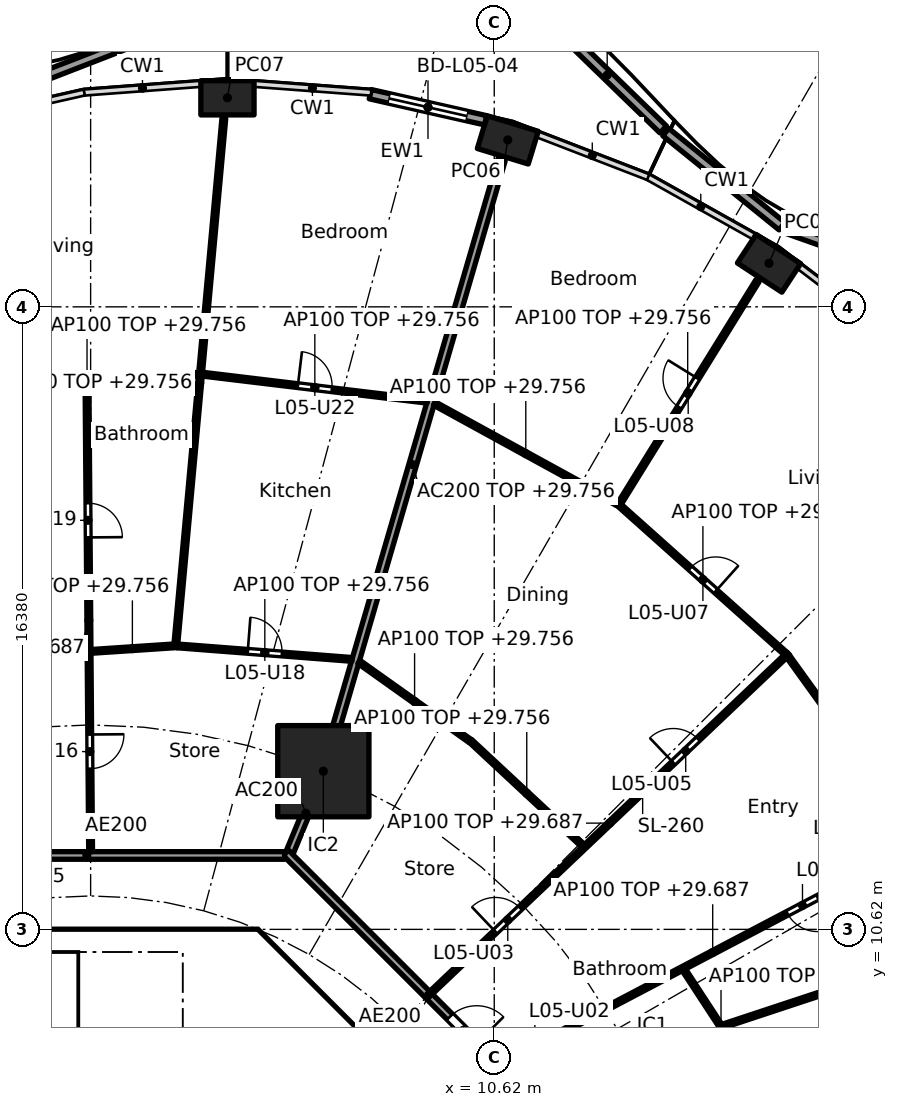
"""IFC4 building model, lengths in metres.
Left out: names, types, materials, properties, quantities, classifications, styles, units other than length and angle.
Written with IfcOpenShell. Run it as: python <this file> out.ifc"""

import sys

from ifc_helpers import new_model, si_unit, direction, frame, frame_2d, origin, origin_2d, place, context, subcontext, project, spatial, polyline, rectangle, hollow_rectangle, outline, extrude, element, fill, save


model = new_model("IFC4")
c1 = context("Model", 3, precision=1e-05, world=origin(), true_north=direction((0.0, 1.0)))
c2 = subcontext(c1, "Body", "Model", "MODEL_VIEW")
j1 = project(units=[si_unit("LENGTHUNIT", "METRE"), si_unit("PLANEANGLEUNIT", "RADIAN")], contexts=[c1])
p1 = place(None, origin())
s1 = spatial("IfcSite", under=j1, at=p1, CompositionType="ELEMENT")
p2 = place(p1, origin())
s2 = spatial("IfcBuilding", under=s1, at=p2, CompositionType="ELEMENT")
p3 = place(p2, frame((0.0, 0.0, 27.0)))
s3 = spatial("IfcBuildingStorey", under=s2, at=p3, CompositionType="ELEMENT", Elevation=27.0)
for number, where, z_axis, x_axis in (
    (1, (17.85, 28.146, 0.0), (0.0, 0.0, 1.0), (-0.836, 0.549, 0.0)),
    (2, (10.976, 31.393, 0.0), (0.0, 0.0, 1.0), (-0.957, 0.292, 0.0)),
    (3, (3.6, 32.5, 0.0), (0.0, 0.0, 1.0), (-1.0, 0.0, 0.0)),
):
    element("IfcColumn", number, at=place(p3, frame(where, z_axis=z_axis, x_axis=x_axis)), inside=s3, PredefinedType="COLUMN", context=c2, shape_type="SweptSolid", body=[
        extrude(hollow_rectangle(XDim=1.4, YDim=0.9, WallThickness=0.05, at=origin_2d()), origin(), (0.0, 0.0, 1.0), 3.7),
    ])
p4 = place(p3, frame((6.123, 14.782, 0.0), z_axis=(0.0, 0.0, 1.0), x_axis=(1.0, 0.0, 0.0)))
e4 = element("IfcColumn", 4, at=p4, inside=s3, PredefinedType="COLUMN", context=c2, shape_type="SweptSolid", body=[
    extrude(rectangle(XDim=2.4, YDim=2.4, at=origin_2d()), origin(), (0.0, 0.0, 1.0), 3.7),
])
p5 = place(p3, frame((7.358, 32.596, 0.0), z_axis=(0.0, 0.0, 1.0), x_axis=(0.97533495413, -0.220729987208, 0.0)))
e5 = element("IfcWall", 5, at=p5, inside=s3, PredefinedType="SOLIDWALL", context=c2, shape_type="SweptSolid", body=[
    extrude(rectangle(XDim=3.115, YDim=0.25, at=frame_2d((1.557, 0.0))), origin(), (0.0, 0.0, 1.0), 3.44),
])
p6 = place(p5, frame((0.507, 0.0, 0.0)))
e6 = element("IfcOpeningElement", 6, at=p6, cuts=e5, PredefinedType="OPENING", context=c2, shape_type="SweptSolid", body=[
    extrude(rectangle(XDim=2.1, YDim=2.4, at=frame_2d((1.05, 1.2))), frame((0.0, 0.135, 0.0), z_axis=(0.0, -1.0, 0.0), x_axis=(1.0, 0.0, 0.0)), (0.0, 0.0, 1.0), 0.27),
])
p7 = place(p3, frame((24.573, 26.838, 0.0), z_axis=(0.0, 0.0, 1.0), x_axis=(-0.94252427227, 0.334137690453, 0.0)))
e7 = element("IfcWall", 7, at=p7, inside=s3, PredefinedType="PARAPET", context=c2, shape_type="SweptSolid", body=[
    extrude(rectangle(XDim=6.657, YDim=0.25, at=frame_2d((3.329, 0.0))), origin(), (0.0, 0.0, 1.0), 1.1),
])
p8 = place(p3, frame((18.193, 29.122, 0.0), z_axis=(0.0, 0.0, 1.0), x_axis=(-0.777298307168, 0.62913221319, 0.0)))
e8 = element("IfcWall", 8, at=p8, inside=s3, PredefinedType="PARAPET", context=c2, shape_type="SweptSolid", body=[
    extrude(rectangle(XDim=3.937, YDim=0.25, at=frame_2d((1.968, 0.0))), origin(), (0.0, 0.0, 1.0), 1.1),
])
p9 = place(p3, frame((15.066, 31.667, 0.0), z_axis=(0.0, 0.0, 1.0), x_axis=(-0.717813068458, 0.696235878672, 0.0)))
e9 = element("IfcWall", 9, at=p9, inside=s3, PredefinedType="PARAPET", context=c2, shape_type="SweptSolid", body=[
    extrude(rectangle(XDim=4.107, YDim=0.25, at=frame_2d((2.054, 0.0))), origin(), (0.0, 0.0, 1.0), 1.1),
])
p10 = place(p3, frame((3.713, 34.99, 0.0), z_axis=(0.0, 0.0, 1.0), x_axis=(-0.932281162563, -0.361734479874, 0.0)))
e10 = element("IfcWall", 10, at=p10, inside=s3, PredefinedType="PARAPET", context=c2, shape_type="SweptSolid", body=[
    extrude(rectangle(XDim=5.513, YDim=0.25, at=frame_2d((2.756, 0.0))), origin(), (0.0, 0.0, 1.0), 1.1),
])
p11 = place(p3, frame((9.988, 4.613, 0.0), z_axis=(0.0, 0.0, 1.0), x_axis=(-0.707106781187, 0.707106781187, 0.0)))
e11 = element("IfcWall", 11, at=p11, inside=s3, PredefinedType="SHEAR", context=c2, shape_type="SweptSolid", body=[
    extrude(rectangle(XDim=7.602, YDim=0.6, at=frame_2d((3.801, 0.0))), origin(), (0.0, 0.0, 1.0), 3.44),
])
p12 = place(p11, frame((3.201, 0.0, 0.0)))
e12 = element("IfcOpeningElement", 12, at=p12, cuts=e11, PredefinedType="OPENING", context=c2, shape_type="SweptSolid", body=[
    extrude(rectangle(XDim=1.2, YDim=2.1, at=frame_2d((0.6, 1.05))), frame((0.0, 0.31, 0.0), z_axis=(0.0, -1.0, 0.0), x_axis=(1.0, 0.0, 0.0)), (0.0, 0.0, 1.0), 0.62),
])
p13 = place(p3, frame((4.0, 7.025, 0.0), z_axis=(0.0, 0.0, 1.0), x_axis=(0.0, 1.0, 0.0)))
e13 = element("IfcWall", 13, at=p13, inside=s3, PredefinedType="SOLIDWALL", context=c2, shape_type="SweptSolid", body=[
    extrude(rectangle(XDim=3.0, YDim=0.2, at=frame_2d((1.5, 0.0))), origin(), (0.0, 0.0, 1.0), 3.44),
])
p14 = place(p13, frame((0.925, 0.0, 0.0)))
e14 = element("IfcOpeningElement", 14, at=p14, cuts=e13, PredefinedType="OPENING", context=c2, shape_type="SweptSolid", body=[
    extrude(rectangle(XDim=1.1, YDim=2.1, at=frame_2d((0.55, 1.05))), frame((0.0, 0.11, 0.0), z_axis=(0.0, -1.0, 0.0), x_axis=(1.0, 0.0, 0.0)), (0.0, 0.0, 1.0), 0.22),
])
p15 = place(p3, origin())
e15 = element("IfcWall", 15, at=p15, inside=s3, PredefinedType="SHEAR", context=c2, shape_type="SweptSolid", body=[
    extrude(outline(polyline([(-4.152, 10.025), (-4.401, 9.776), (-4.825, 10.2), (-4.401, 10.625), (4.401, 10.625), (4.825, 10.2), (4.401, 9.776), (4.152, 10.025), (-4.152, 10.025)])), origin(), (0.0, 0.0, 1.0), 3.44),
])
p16 = place(p3, frame((5.243, 12.657, 0.0), z_axis=(0.0, 0.0, 1.0), x_axis=(0.382707856524, 0.923869415315, 0.0)))
e16 = element("IfcWall", 16, at=p16, inside=s3, PredefinedType="PARTITIONING", context=c2, shape_type="SweptSolid", body=[
    extrude(rectangle(XDim=2.2, YDim=0.2, at=frame_2d((1.1, 0.0))), origin(), (0.0, 0.0, 1.0), 3.44),
])
p17 = place(p3, frame((6.137, 14.83, 0.0), z_axis=(0.0, 0.0, 1.0), x_axis=(0.27985745069, 0.960041565399, 0.0)))
e17 = element("IfcWall", 17, at=p17, inside=s3, PredefinedType="PARTITIONING", context=c2, shape_type="SweptSolid", body=[
    extrude(rectangle(XDim=16.705, YDim=0.2, at=frame_2d((8.353, 0.0))), origin(), (0.0, 0.0, 1.0), 2.756),
])
p18 = place(p3, frame((12.635, 5.134, 0.0), z_axis=(0.0, 0.0, 1.0), x_axis=(-0.707106781187, 0.707106781187, 0.0)))
e18 = element("IfcWall", 18, at=p18, inside=s3, PredefinedType="PARTITIONING", context=c2, shape_type="SweptSolid", body=[
    extrude(rectangle(XDim=10.609, YDim=0.2, at=frame_2d((5.305, 0.0))), origin(), (0.0, 0.0, 1.0), 3.44),
])
p19 = place(p18, frame((3.503, 0.0, 0.0)))
e19 = element("IfcOpeningElement", 19, at=p19, cuts=e18, PredefinedType="OPENING", context=c2, shape_type="SweptSolid", body=[
    extrude(rectangle(XDim=1.0, YDim=2.1, at=frame_2d((0.5, 1.05))), frame((0.0, 0.11, 0.0), z_axis=(0.0, -1.0, 0.0), x_axis=(1.0, 0.0, 0.0)), (0.0, 0.0, 1.0), 0.22),
])
p20 = place(p3, frame((5.104, 12.565, 0.0), z_axis=(0.0, 0.0, 1.0), x_axis=(-1.0, 0.0, 0.0)))
e20 = element("IfcWall", 20, at=p20, inside=s3, PredefinedType="PARTITIONING", context=c2, shape_type="SweptSolid", body=[
    extrude(rectangle(XDim=10.409, YDim=0.2, at=frame_2d((5.205, 0.0))), origin(), (0.0, 0.0, 1.0), 3.44),
])
p21 = place(p20, frame((6.339, 0.0, 0.0)))
e21 = element("IfcOpeningElement", 21, at=p21, cuts=e20, PredefinedType="OPENING", context=c2, shape_type="SweptSolid", body=[
    extrude(rectangle(XDim=1.0, YDim=2.1, at=frame_2d((0.5, 1.05))), frame((0.0, 0.11, 0.0), z_axis=(0.0, -1.0, 0.0), x_axis=(1.0, 0.0, 0.0)), (0.0, 0.0, 1.0), 0.22),
])
p22 = place(p3, frame((17.564, 6.569, 0.0), z_axis=(0.0, 0.0, 1.0), x_axis=(-0.547641765292, 0.836712911881, 0.0)))
e22 = element("IfcWall", 22, at=p22, inside=s3, PredefinedType="PARTITIONING", context=c2, shape_type="SweptSolid", body=[
    extrude(rectangle(XDim=3.57, YDim=0.1, at=frame_2d((1.785, 0.0))), origin(), (0.0, 0.0, 1.0), 2.756),
])
p23 = place(p3, frame((16.635, 8.078, 0.0), z_axis=(0.0, 0.0, 1.0), x_axis=(0.949412285442, 0.314032342684, 0.0)))
e23 = element("IfcWall", 23, at=p23, inside=s3, PredefinedType="PARTITIONING", context=c2, shape_type="SweptSolid", body=[
    extrude(rectangle(XDim=14.451, YDim=0.1, at=frame_2d((7.226, 0.0))), origin(), (0.0, 0.0, 1.0), 2.837),
])
p24 = place(p3, frame((10.813, 7.091, 0.0), z_axis=(0.0, 0.0, 1.0), x_axis=(0.885182649479, 0.465243674928, 0.0)))
e24 = element("IfcWall", 24, at=p24, inside=s3, PredefinedType="PARTITIONING", context=c2, shape_type="SweptSolid", body=[
    extrude(rectangle(XDim=12.551, YDim=0.1, at=frame_2d((6.275, 0.0))), origin(), (0.0, 0.0, 1.0), 2.687),
])
p25 = place(p24, frame((0.539, 0.0, 0.0)))
e25 = element("IfcOpeningElement", 25, at=p25, cuts=e24, PredefinedType="OPENING", context=c2, shape_type="SweptSolid", body=[
    extrude(rectangle(XDim=0.9, YDim=2.1, at=frame_2d((0.45, 1.05))), frame((0.0, 0.06, 0.0), z_axis=(0.0, -1.0, 0.0), x_axis=(1.0, 0.0, 0.0)), (0.0, 0.0, 1.0), 0.12),
])
p26 = place(p24, frame((8.494, 0.0, 0.0)))
e26 = element("IfcOpeningElement", 26, at=p26, cuts=e24, PredefinedType="OPENING", context=c2, shape_type="SweptSolid", body=[
    extrude(rectangle(XDim=0.9, YDim=2.1, at=frame_2d((0.45, 1.05))), frame((0.0, 0.06, 0.0), z_axis=(0.0, -1.0, 0.0), x_axis=(1.0, 0.0, 0.0)), (0.0, 0.0, 1.0), 0.12),
])
p27 = place(p3, frame((21.849, 12.948, 0.0), z_axis=(0.0, 0.0, 1.0), x_axis=(-0.584563700282, 0.811347817099, 0.0)))
e27 = element("IfcWall", 27, at=p27, inside=s3, PredefinedType="PARTITIONING", context=c2, shape_type="SweptSolid", body=[
    extrude(rectangle(XDim=5.984, YDim=0.1, at=frame_2d((2.992, 0.0))), origin(), (0.0, 0.0, 1.0), 2.756),
])
p28 = place(p27, frame((1.046, 0.0, 0.0)))
e28 = element("IfcOpeningElement", 28, at=p28, cuts=e27, PredefinedType="OPENING", context=c2, shape_type="SweptSolid", body=[
    extrude(rectangle(XDim=0.9, YDim=2.1, at=frame_2d((0.45, 1.05))), frame((0.0, 0.06, 0.0), z_axis=(0.0, -1.0, 0.0), x_axis=(1.0, 0.0, 0.0)), (0.0, 0.0, 1.0), 0.12),
])
p29 = place(p3, frame((8.957, 8.953, 0.0), z_axis=(0.0, 0.0, 1.0), x_axis=(0.725250022034, 0.688485588476, 0.0)))
e29 = element("IfcWall", 29, at=p29, inside=s3, PredefinedType="PARTITIONING", context=c2, shape_type="SweptSolid", body=[
    extrude(rectangle(XDim=12.963, YDim=0.1, at=frame_2d((6.481, 0.0))), origin(), (0.0, 0.0, 1.0), 2.687),
])
p30 = place(p29, frame((2.333, 0.0, 0.0)))
e30 = element("IfcOpeningElement", 30, at=p30, cuts=e29, PredefinedType="OPENING", context=c2, shape_type="SweptSolid", body=[
    extrude(rectangle(XDim=0.9, YDim=2.1, at=frame_2d((0.45, 1.05))), frame((0.0, 0.06, 0.0), z_axis=(0.0, -1.0, 0.0), x_axis=(1.0, 0.0, 0.0)), (0.0, 0.0, 1.0), 0.12),
])
p31 = place(p29, frame((8.79, 0.0, 0.0)))
e31 = element("IfcOpeningElement", 31, at=p31, cuts=e29, PredefinedType="OPENING", context=c2, shape_type="SweptSolid", body=[
    extrude(rectangle(XDim=0.9, YDim=2.1, at=frame_2d((0.45, 1.05))), frame((0.0, 0.06, 0.0), z_axis=(0.0, -1.0, 0.0), x_axis=(1.0, 0.0, 0.0)), (0.0, 0.0, 1.0), 0.12),
])
p32 = place(p3, frame((12.958, 12.82, 0.0), z_axis=(0.0, 0.0, 1.0), x_axis=(-0.732028724098, 0.681273768096, 0.0)))
e32 = element("IfcWall", 32, at=p32, inside=s3, PredefinedType="PARTITIONING", context=c2, shape_type="SweptSolid", body=[
    extrude(rectangle(XDim=4.05, YDim=0.1, at=frame_2d((2.025, 0.0))), origin(), (0.0, 0.0, 1.0), 2.756),
])
p33 = place(p3, frame((18.285, 17.877, 0.0), z_axis=(0.0, 0.0, 1.0), x_axis=(-0.745806142791, 0.666163041136, 0.0)))
e33 = element("IfcWall", 33, at=p33, inside=s3, PredefinedType="PARTITIONING", context=c2, shape_type="SweptSolid", body=[
    extrude(rectangle(XDim=5.831, YDim=0.1, at=frame_2d((2.915, 0.0))), origin(), (0.0, 0.0, 1.0), 2.756),
])
p34 = place(p33, frame((2.465, 0.0, 0.0)))
e34 = element("IfcOpeningElement", 34, at=p34, cuts=e33, PredefinedType="OPENING", context=c2, shape_type="SweptSolid", body=[
    extrude(rectangle(XDim=0.9, YDim=2.1, at=frame_2d((0.45, 1.05))), frame((0.0, 0.06, 0.0), z_axis=(0.0, -1.0, 0.0), x_axis=(1.0, 0.0, 0.0)), (0.0, 0.0, 1.0), 0.12),
])
p35 = place(p3, frame((9.989, 15.574, 0.0), z_axis=(0.0, 0.0, 1.0), x_axis=(-0.81492039338, 0.57957290521, 0.0)))
e35 = element("IfcWall", 35, at=p35, inside=s3, PredefinedType="PARTITIONING", context=c2, shape_type="SweptSolid", body=[
    extrude(rectangle(XDim=3.594, YDim=0.1, at=frame_2d((1.797, 0.0))), origin(), (0.0, 0.0, 1.0), 2.756),
])
p36 = place(p3, frame((13.873, 21.752, 0.0), z_axis=(0.0, 0.0, 1.0), x_axis=(0.52644491616, 0.850209239099, 0.0)))
e36 = element("IfcWall", 36, at=p36, inside=s3, PredefinedType="PARTITIONING", context=c2, shape_type="SweptSolid", body=[
    extrude(rectangle(XDim=6.98, YDim=0.1, at=frame_2d((3.49, 0.0))), origin(), (0.0, 0.0, 1.0), 2.756),
])
p37 = place(p36, frame((3.065, 0.0, 0.0)))
e37 = element("IfcOpeningElement", 37, at=p37, cuts=e36, PredefinedType="OPENING", context=c2, shape_type="SweptSolid", body=[
    extrude(rectangle(XDim=0.9, YDim=2.1, at=frame_2d((0.45, 1.05))), frame((0.0, 0.06, 0.0), z_axis=(0.0, -1.0, 0.0), x_axis=(1.0, 0.0, 0.0)), (0.0, 0.0, 1.0), 0.12),
])
p38 = place(p3, frame((13.855, 21.818, 0.0), z_axis=(0.0, 0.0, 1.0), x_axis=(-0.876809987787, 0.480837025734, 0.0)))
e38 = element("IfcWall", 38, at=p38, inside=s3, PredefinedType="PARTITIONING", context=c2, shape_type="SweptSolid", body=[
    extrude(rectangle(XDim=5.486, YDim=0.1, at=frame_2d((2.743, 0.0))), origin(), (0.0, 0.0, 1.0), 2.756),
])
p39 = place(p3, frame((6.878, 17.723, 0.0), z_axis=(0.0, 0.0, 1.0), x_axis=(-0.99701850123, 0.077162868047, 0.0)))
e39 = element("IfcWall", 39, at=p39, inside=s3, PredefinedType="PARTITIONING", context=c2, shape_type="SweptSolid", body=[
    extrude(rectangle(XDim=4.604, YDim=0.1, at=frame_2d((2.302, 0.0))), origin(), (0.0, 0.0, 1.0), 2.756),
])
p40 = place(p39, frame((1.852, 0.0, 0.0)))
e40 = element("IfcOpeningElement", 40, at=p40, cuts=e39, PredefinedType="OPENING", context=c2, shape_type="SweptSolid", body=[
    extrude(rectangle(XDim=0.9, YDim=2.1, at=frame_2d((0.45, 1.05))), frame((0.0, 0.06, 0.0), z_axis=(0.0, -1.0, 0.0), x_axis=(1.0, 0.0, 0.0)), (0.0, 0.0, 1.0), 0.12),
])
p41 = place(p3, frame((8.858, 24.516, 0.0), z_axis=(0.0, 0.0, 1.0), x_axis=(-0.992834127896, 0.119500604542, 0.0)))
e41 = element("IfcWall", 41, at=p41, inside=s3, PredefinedType="PARTITIONING", context=c2, shape_type="SweptSolid", body=[
    extrude(rectangle(XDim=5.959, YDim=0.1, at=frame_2d((2.98, 0.0))), origin(), (0.0, 0.0, 1.0), 2.756),
])
p42 = place(p41, frame((2.53, 0.0, 0.0)))
e42 = element("IfcOpeningElement", 42, at=p42, cuts=e41, PredefinedType="OPENING", context=c2, shape_type="SweptSolid", body=[
    extrude(rectangle(XDim=0.9, YDim=2.1, at=frame_2d((0.45, 1.05))), frame((0.0, 0.06, 0.0), z_axis=(0.0, -1.0, 0.0), x_axis=(1.0, 0.0, 0.0)), (0.0, 0.0, 1.0), 0.12),
])
p43 = place(p3, frame((2.234, 18.032, 0.0), z_axis=(0.0, 0.0, 1.0), x_axis=(0.090891502968, 0.995860800859, 0.0)))
e43 = element("IfcWall", 43, at=p43, inside=s3, PredefinedType="PARTITIONING", context=c2, shape_type="SweptSolid", body=[
    extrude(rectangle(XDim=13.984, YDim=0.1, at=frame_2d((6.992, 0.0))), origin(), (0.0, 0.0, 1.0), 2.756),
])
p44 = place(p3, frame((2.188, 18.079, 0.0), z_axis=(0.0, 0.0, 1.0), x_axis=(-0.997794542617, -0.066378089183, 0.0)))
e44 = element("IfcWall", 44, at=p44, inside=s3, PredefinedType="PARTITIONING", context=c2, shape_type="SweptSolid", body=[
    extrude(rectangle(XDim=2.185, YDim=0.1, at=frame_2d((1.092, 0.0))), origin(), (0.0, 0.0, 1.0), 2.756),
])
p45 = place(p3, frame((2.842, 25.229, 0.0), z_axis=(0.0, 0.0, 1.0), x_axis=(-0.993255612046, -0.115945198862, 0.0)))
e45 = element("IfcWall", 45, at=p45, inside=s3, PredefinedType="PARTITIONING", context=c2, shape_type="SweptSolid", body=[
    extrude(rectangle(XDim=5.913, YDim=0.1, at=frame_2d((2.956, 0.0))), origin(), (0.0, 0.0, 1.0), 2.756),
])
p46 = place(p3, frame((-0.001, 12.665, 0.0), z_axis=(0.0, 0.0, 1.0), x_axis=(-0.007702417287, 0.999970335944, 0.0)))
e46 = element("IfcWall", 46, at=p46, inside=s3, PredefinedType="PARTITIONING", context=c2, shape_type="SweptSolid", body=[
    extrude(rectangle(XDim=12.171, YDim=0.1, at=frame_2d((6.086, 0.0))), origin(), (0.0, 0.0, 1.0), 2.687),
])
p47 = place(p46, frame((2.183, 0.0, 0.0)))
e47 = element("IfcOpeningElement", 47, at=p47, cuts=e46, PredefinedType="OPENING", context=c2, shape_type="SweptSolid", body=[
    extrude(rectangle(XDim=0.9, YDim=2.1, at=frame_2d((0.45, 1.05))), frame((0.0, 0.06, 0.0), z_axis=(0.0, -1.0, 0.0), x_axis=(1.0, 0.0, 0.0)), (0.0, 0.0, 1.0), 0.12),
])
p48 = place(p46, frame((8.269, 0.0, 0.0)))
e48 = element("IfcOpeningElement", 48, at=p48, cuts=e46, PredefinedType="OPENING", context=c2, shape_type="SweptSolid", body=[
    extrude(rectangle(XDim=0.9, YDim=2.1, at=frame_2d((0.45, 1.05))), frame((0.0, 0.06, 0.0), z_axis=(0.0, -1.0, 0.0), x_axis=(1.0, 0.0, 0.0)), (0.0, 0.0, 1.0), 0.12),
])
p49 = place(p6, origin())
e49 = element("IfcDoor", 49, at=p49, inside=s3, OperationType="SLIDING_TO_LEFT", PredefinedType="DOOR", context=c2, shape_type="SweptSolid", body=[
    extrude(rectangle(XDim=2.1, YDim=2.4, at=frame_2d((1.05, 1.2))), frame((0.0, 0.025, 0.0), z_axis=(0.0, -1.0, 0.0), x_axis=(1.0, 0.0, 0.0)), (0.0, 0.0, 1.0), 0.05),
])
fill(e6, e49)
p50 = place(p14, origin())
e50 = element("IfcDoor", 50, at=p50, inside=s3, OperationType="SINGLE_SWING_RIGHT", PredefinedType="DOOR", context=c2, shape_type="SweptSolid", body=[
    extrude(rectangle(XDim=1.1, YDim=2.1, at=frame_2d((0.55, 1.05))), frame((0.0, 0.025, 0.0), z_axis=(0.0, -1.0, 0.0), x_axis=(1.0, 0.0, 0.0)), (0.0, 0.0, 1.0), 0.05),
])
fill(e14, e50)
p51 = place(p19, frame((1.0, 0.0, 0.0), x_axis=(-1.0, 0.0, 0.0)))
e51 = element("IfcDoor", 51, at=p51, inside=s3, OperationType="SINGLE_SWING_RIGHT", PredefinedType="DOOR", context=c2, shape_type="SweptSolid", body=[
    extrude(rectangle(XDim=1.0, YDim=2.1, at=frame_2d((0.5, 1.05))), frame((0.0, 0.025, 0.0), z_axis=(0.0, -1.0, 0.0), x_axis=(1.0, 0.0, 0.0)), (0.0, 0.0, 1.0), 0.05),
])
fill(e19, e51)
p52 = place(p30, origin())
e52 = element("IfcDoor", 52, at=p52, inside=s3, OperationType="SINGLE_SWING_LEFT", PredefinedType="DOOR", context=c2, shape_type="SweptSolid", body=[
    extrude(rectangle(XDim=0.9, YDim=2.1, at=frame_2d((0.45, 1.05))), frame((0.0, 0.025, 0.0), z_axis=(0.0, -1.0, 0.0), x_axis=(1.0, 0.0, 0.0)), (0.0, 0.0, 1.0), 0.05),
])
fill(e30, e52)
p53 = place(p26, frame((0.9, 0.0, 0.0), x_axis=(-1.0, 0.0, 0.0)))
e53 = element("IfcDoor", 53, at=p53, inside=s3, OperationType="SINGLE_SWING_LEFT", PredefinedType="DOOR", context=c2, shape_type="SweptSolid", body=[
    extrude(rectangle(XDim=0.9, YDim=2.1, at=frame_2d((0.45, 1.05))), frame((0.0, 0.025, 0.0), z_axis=(0.0, -1.0, 0.0), x_axis=(1.0, 0.0, 0.0)), (0.0, 0.0, 1.0), 0.05),
])
fill(e26, e53)
p54 = place(p31, origin())
e54 = element("IfcDoor", 54, at=p54, inside=s3, OperationType="SINGLE_SWING_LEFT", PredefinedType="DOOR", context=c2, shape_type="SweptSolid", body=[
    extrude(rectangle(XDim=0.9, YDim=2.1, at=frame_2d((0.45, 1.05))), frame((0.0, 0.025, 0.0), z_axis=(0.0, -1.0, 0.0), x_axis=(1.0, 0.0, 0.0)), (0.0, 0.0, 1.0), 0.05),
])
fill(e31, e54)
p55 = place(p34, frame((0.9, 0.0, 0.0), x_axis=(-1.0, 0.0, 0.0)))
e55 = element("IfcDoor", 55, at=p55, inside=s3, OperationType="SINGLE_SWING_RIGHT", PredefinedType="DOOR", context=c2, shape_type="SweptSolid", body=[
    extrude(rectangle(XDim=0.9, YDim=2.1, at=frame_2d((0.45, 1.05))), frame((0.0, 0.025, 0.0), z_axis=(0.0, -1.0, 0.0), x_axis=(1.0, 0.0, 0.0)), (0.0, 0.0, 1.0), 0.05),
])
fill(e34, e55)
p56 = place(p37, origin())
e56 = element("IfcDoor", 56, at=p56, inside=s3, OperationType="SINGLE_SWING_RIGHT", PredefinedType="DOOR", context=c2, shape_type="SweptSolid", body=[
    extrude(rectangle(XDim=0.9, YDim=2.1, at=frame_2d((0.45, 1.05))), frame((0.0, 0.025, 0.0), z_axis=(0.0, -1.0, 0.0), x_axis=(1.0, 0.0, 0.0)), (0.0, 0.0, 1.0), 0.05),
])
fill(e37, e56)
p57 = place(p47, frame((0.9, 0.0, 0.0), x_axis=(-1.0, 0.0, 0.0)))
e57 = element("IfcDoor", 57, at=p57, inside=s3, OperationType="SINGLE_SWING_LEFT", PredefinedType="DOOR", context=c2, shape_type="SweptSolid", body=[
    extrude(rectangle(XDim=0.9, YDim=2.1, at=frame_2d((0.45, 1.05))), frame((0.0, 0.025, 0.0), z_axis=(0.0, -1.0, 0.0), x_axis=(1.0, 0.0, 0.0)), (0.0, 0.0, 1.0), 0.05),
])
fill(e47, e57)
p58 = place(p40, frame((0.9, 0.0, 0.0), x_axis=(-1.0, 0.0, 0.0)))
e58 = element("IfcDoor", 58, at=p58, inside=s3, OperationType="SINGLE_SWING_LEFT", PredefinedType="DOOR", context=c2, shape_type="SweptSolid", body=[
    extrude(rectangle(XDim=0.9, YDim=2.1, at=frame_2d((0.45, 1.05))), frame((0.0, 0.025, 0.0), z_axis=(0.0, -1.0, 0.0), x_axis=(1.0, 0.0, 0.0)), (0.0, 0.0, 1.0), 0.05),
])
fill(e40, e58)
p59 = place(p48, frame((0.9, 0.0, 0.0), x_axis=(-1.0, 0.0, 0.0)))
e59 = element("IfcDoor", 59, at=p59, inside=s3, OperationType="SINGLE_SWING_RIGHT", PredefinedType="DOOR", context=c2, shape_type="SweptSolid", body=[
    extrude(rectangle(XDim=0.9, YDim=2.1, at=frame_2d((0.45, 1.05))), frame((0.0, 0.025, 0.0), z_axis=(0.0, -1.0, 0.0), x_axis=(1.0, 0.0, 0.0)), (0.0, 0.0, 1.0), 0.05),
])
fill(e48, e59)
p60 = place(p42, frame((0.9, 0.0, 0.0), x_axis=(-1.0, 0.0, 0.0)))
e60 = element("IfcDoor", 60, at=p60, inside=s3, OperationType="SINGLE_SWING_LEFT", PredefinedType="DOOR", context=c2, shape_type="SweptSolid", body=[
    extrude(rectangle(XDim=0.9, YDim=2.1, at=frame_2d((0.45, 1.05))), frame((0.0, 0.025, 0.0), z_axis=(0.0, -1.0, 0.0), x_axis=(1.0, 0.0, 0.0)), (0.0, 0.0, 1.0), 0.05),
])
fill(e42, e60)
save(model, sys.argv[1])
